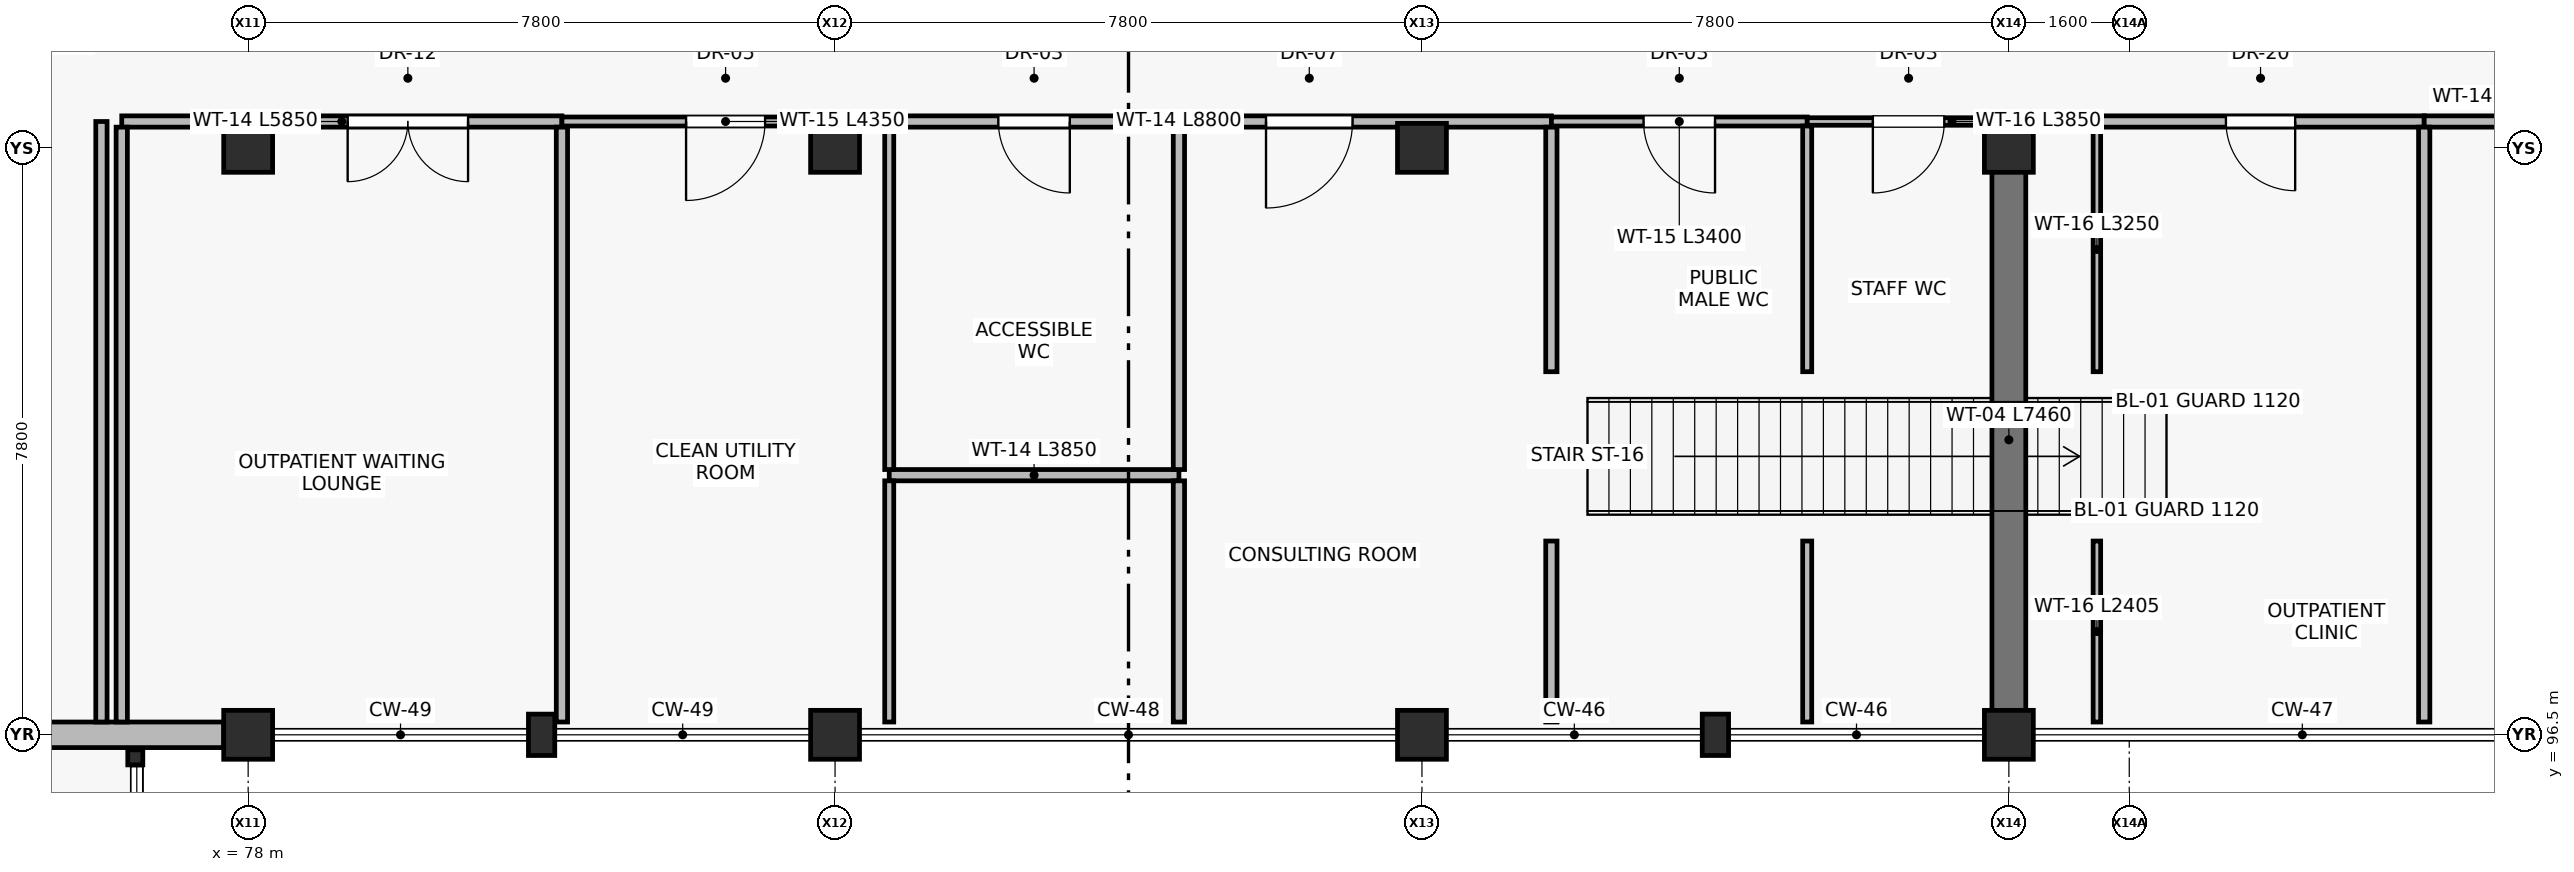
"""IFC4 building model, lengths in metres.
Left out: names, types, materials, properties, quantities, classifications, styles, units other than length and angle.
Written with IfcOpenShell. Run it as: python <this file> out.ifc"""

import sys

from ifc_helpers import new_model, si_unit, direction, frame, frame_2d, origin, origin_2d, place, context, subcontext, project, spatial, rectangle, hollow_rectangle, extrude, element, fill, save


model = new_model("IFC4")
c1 = context("Model", 3, precision=1e-05, world=origin(), true_north=direction((0.0, 1.0)))
c2 = subcontext(c1, "Body", "Model", "MODEL_VIEW")
j1 = project(units=[si_unit("LENGTHUNIT", "METRE"), si_unit("PLANEANGLEUNIT", "RADIAN")], contexts=[c1])
p1 = place(None, origin())
s1 = spatial("IfcSite", under=j1, at=p1, CompositionType="ELEMENT")
p2 = place(p1, origin())
s2 = spatial("IfcBuilding", under=s1, at=p2, CompositionType="ELEMENT")
p3 = place(p2, origin())
s3 = spatial("IfcBuildingStorey", under=s2, at=p3, CompositionType="ELEMENT", Elevation=0.0)
for number, where, z_axis, x_axis in (
    (1, (78.0, 96.5, 0.0), (0.0, 0.0, 1.0), (1.0, 0.0, 0.0)),
    (2, (78.0, 104.3, 0.0), (0.0, 0.0, 1.0), (1.0, 0.0, 0.0)),
    (3, (85.8, 96.5, 0.0), (0.0, 0.0, 1.0), (1.0, 0.0, 0.0)),
    (4, (85.8, 104.3, 0.0), (0.0, 0.0, 1.0), (1.0, 0.0, 0.0)),
    (5, (93.6, 96.5, 0.0), (0.0, 0.0, 1.0), (1.0, 0.0, 0.0)),
    (6, (93.6, 104.3, 0.0), (0.0, 0.0, 1.0), (1.0, 0.0, 0.0)),
    (7, (101.4, 96.5, 0.0), (0.0, 0.0, 1.0), (1.0, 0.0, 0.0)),
    (8, (101.4, 104.3, 0.0), (0.0, 0.0, 1.0), (1.0, 0.0, 0.0)),
):
    element("IfcColumn", number, at=place(p3, frame(where, z_axis=z_axis, x_axis=x_axis)), inside=s3, PredefinedType="COLUMN", context=c2, shape_type="SweptSolid", body=[
        extrude(rectangle(XDim=0.65, YDim=0.65, at=origin_2d()), origin(), (0.0, 0.0, 1.0), 4.8),
    ])
p4 = place(p3, frame((76.5, 96.2, 0.0), z_axis=(0.0, 0.0, 1.0), x_axis=(1.0, 0.0, 0.0)))
e9 = element("IfcColumn", 9, at=p4, inside=s3, PredefinedType="COLUMN", context=c2, shape_type="SweptSolid", body=[
    extrude(hollow_rectangle(XDim=0.2, YDim=0.2, WallThickness=0.01, at=origin_2d()), origin(), (0.0, 0.0, 1.0), 4.8),
])
for number, where, z_axis, x_axis in (
    (10, (81.9, 96.5, 0.0), (0.0, 0.0, 1.0), (1.0, 0.0, 0.0)),
    (11, (97.5, 96.5, 0.0), (0.0, 0.0, 1.0), (1.0, 0.0, 0.0)),
):
    element("IfcColumn", number, at=place(p3, frame(where, z_axis=z_axis, x_axis=x_axis)), inside=s3, PredefinedType="PILASTER", context=c2, shape_type="SweptSolid", body=[
        extrude(rectangle(XDim=0.35, YDim=0.55, at=origin_2d()), origin(), (0.0, 0.0, 1.0), 4.8),
    ])
p5 = place(p3, frame((77.675, 96.5, 0.0), z_axis=(0.0, 0.0, 1.0), x_axis=(-1.0, 0.0, 0.0)))
e12 = element("IfcWall", 12, at=p5, inside=s3, PredefinedType="STANDARD", context=c2, shape_type="SweptSolid", body=[
    extrude(rectangle(XDim=7.15, YDim=0.34, at=frame_2d((3.575, 0.0))), origin(), (0.0, 0.0, 1.0), 3.385),
])
p6 = place(p5, frame((2.475, 0.0, 0.0)))
e13 = element("IfcOpeningElement", 13, at=p6, cuts=e12, PredefinedType="OPENING", context=c2, shape_type="SweptSolid", body=[
    extrude(rectangle(XDim=1.6, YDim=2.2, at=frame_2d((0.8, 1.1))), frame((0.0, 0.18, 0.0), z_axis=(0.0, -1.0, 0.0), x_axis=(1.0, 0.0, 0.0)), (0.0, 0.0, 1.0), 0.36),
])
p7 = place(p3, frame((101.4, 96.69, 0.0), z_axis=(0.0, 0.0, 1.0), x_axis=(0.0, 1.0, 0.0)))
e14 = element("IfcWall", 14, at=p7, inside=s3, PredefinedType="SHEAR", context=c2, shape_type="SweptSolid", body=[
    extrude(rectangle(XDim=7.46, YDim=0.45, at=frame_2d((3.73, 0.0))), origin(), (0.0, 0.0, 1.0), 4.54),
])
p8 = place(p3, frame((76.05, 96.67, 0.0), z_axis=(0.0, 0.0, 1.0), x_axis=(0.0, 1.0, 0.0)))
e15 = element("IfcWall", 15, at=p8, inside=s3, PredefinedType="PARTITIONING", context=c2, shape_type="SweptSolid", body=[
    extrude(rectangle(XDim=7.98, YDim=0.15, at=frame_2d((3.99, 0.0))), origin(), (0.0, 0.0, 1.0), 4.54),
])
p9 = place(p3, frame((82.17, 104.65, 0.0), z_axis=(0.0, 0.0, 1.0), x_axis=(-1.0, 0.0, 0.0)))
e16 = element("IfcWall", 16, at=p9, inside=s3, PredefinedType="PARTITIONING", context=c2, shape_type="SweptSolid", body=[
    extrude(rectangle(XDim=5.85, YDim=0.15, at=frame_2d((2.925, 0.0))), origin(), (0.0, 0.0, 1.0), 4.04),
])
p10 = place(p9, frame((1.248, 0.0, 0.0)))
e17 = element("IfcOpeningElement", 17, at=p10, cuts=e16, PredefinedType="OPENING", context=c2, shape_type="SweptSolid", body=[
    extrude(rectangle(XDim=1.6, YDim=2.2, at=frame_2d((0.8, 1.1))), frame((0.0, 0.085, 0.0), z_axis=(0.0, -1.0, 0.0), x_axis=(1.0, 0.0, 0.0)), (0.0, 0.0, 1.0), 0.17),
])
p11 = place(p3, frame((86.52, 104.65, 0.0), z_axis=(0.0, 0.0, 1.0), x_axis=(-1.0, 0.0, 0.0)))
e18 = element("IfcWall", 18, at=p11, inside=s3, PredefinedType="PARTITIONING", context=c2, shape_type="SweptSolid", body=[
    extrude(rectangle(XDim=4.35, YDim=0.12, at=frame_2d((2.175, 0.0))), origin(), (0.0, 0.0, 1.0), 4.04),
])
p12 = place(p11, frame((1.65, 0.0, 0.0)))
e19 = element("IfcOpeningElement", 19, at=p12, cuts=e18, PredefinedType="OPENING", context=c2, shape_type="SweptSolid", body=[
    extrude(rectangle(XDim=1.05, YDim=2.15, at=frame_2d((0.525, 1.075))), frame((0.0, 0.07, 0.0), z_axis=(0.0, -1.0, 0.0), x_axis=(1.0, 0.0, 0.0)), (0.0, 0.0, 1.0), 0.14),
])
p13 = place(p3, frame((90.37, 104.65, 0.0), z_axis=(0.0, 0.0, 1.0), x_axis=(-1.0, 0.0, 0.0)))
e20 = element("IfcWall", 20, at=p13, inside=s3, PredefinedType="PARTITIONING", context=c2, shape_type="SweptSolid", body=[
    extrude(rectangle(XDim=3.85, YDim=0.15, at=frame_2d((1.925, 0.0))), origin(), (0.0, 0.0, 1.0), 4.04),
])
p14 = place(p13, frame((1.45, 0.0, 0.0)))
e21 = element("IfcOpeningElement", 21, at=p14, cuts=e20, PredefinedType="OPENING", context=c2, shape_type="SweptSolid", body=[
    extrude(rectangle(XDim=0.95, YDim=2.1, at=frame_2d((0.475, 1.05))), frame((0.0, 0.085, 0.0), z_axis=(0.0, -1.0, 0.0), x_axis=(1.0, 0.0, 0.0)), (0.0, 0.0, 1.0), 0.17),
])
p15 = place(p3, frame((86.52, 99.95, 0.0), z_axis=(0.0, 0.0, 1.0), x_axis=(1.0, 0.0, 0.0)))
e22 = element("IfcWall", 22, at=p15, inside=s3, PredefinedType="PARTITIONING", context=c2, shape_type="SweptSolid", body=[
    extrude(rectangle(XDim=3.85, YDim=0.15, at=frame_2d((1.925, 0.0))), origin(), (0.0, 0.0, 1.0), 4.54),
])
p16 = place(p3, frame((95.32, 104.65, 0.0), z_axis=(0.0, 0.0, 1.0), x_axis=(-1.0, 0.0, 0.0)))
e23 = element("IfcWall", 23, at=p16, inside=s3, PredefinedType="PARTITIONING", context=c2, shape_type="SweptSolid", body=[
    extrude(rectangle(XDim=4.95, YDim=0.15, at=frame_2d((2.475, 0.0))), origin(), (0.0, 0.0, 1.0), 4.04),
])
p17 = place(p16, frame((2.643, 0.0, 0.0)))
e24 = element("IfcOpeningElement", 24, at=p17, cuts=e23, PredefinedType="OPENING", context=c2, shape_type="SweptSolid", body=[
    extrude(rectangle(XDim=1.15, YDim=2.2, at=frame_2d((0.575, 1.1))), frame((0.0, 0.085, 0.0), z_axis=(0.0, -1.0, 0.0), x_axis=(1.0, 0.0, 0.0)), (0.0, 0.0, 1.0), 0.17),
])
p18 = place(p3, frame((98.72, 104.65, 0.0), z_axis=(0.0, 0.0, 1.0), x_axis=(-1.0, 0.0, 0.0)))
e25 = element("IfcWall", 25, at=p18, inside=s3, PredefinedType="PARTITIONING", context=c2, shape_type="SweptSolid", body=[
    extrude(rectangle(XDim=3.4, YDim=0.12, at=frame_2d((1.7, 0.0))), origin(), (0.0, 0.0, 1.0), 4.04),
])
p19 = place(p18, frame((1.225, 0.0, 0.0)))
e26 = element("IfcOpeningElement", 26, at=p19, cuts=e25, PredefinedType="OPENING", context=c2, shape_type="SweptSolid", body=[
    extrude(rectangle(XDim=0.95, YDim=2.1, at=frame_2d((0.475, 1.05))), frame((0.0, 0.07, 0.0), z_axis=(0.0, -1.0, 0.0), x_axis=(1.0, 0.0, 0.0)), (0.0, 0.0, 1.0), 0.14),
])
p20 = place(p3, frame((102.57, 104.65, 0.0), z_axis=(0.0, 0.0, 1.0), x_axis=(-1.0, 0.0, 0.0)))
e27 = element("IfcWall", 27, at=p20, inside=s3, PredefinedType="PARTITIONING", context=c2, shape_type="SweptSolid", body=[
    extrude(rectangle(XDim=3.85, YDim=0.1, at=frame_2d((1.925, 0.0))), origin(), (0.0, 0.0, 1.0), 4.04),
])
p21 = place(p20, frame((2.028, 0.0, 0.0)))
e28 = element("IfcOpeningElement", 28, at=p21, cuts=e27, PredefinedType="OPENING", context=c2, shape_type="SweptSolid", body=[
    extrude(rectangle(XDim=0.95, YDim=2.1, at=frame_2d((0.475, 1.05))), frame((0.0, 0.06, 0.0), z_axis=(0.0, -1.0, 0.0), x_axis=(1.0, 0.0, 0.0)), (0.0, 0.0, 1.0), 0.12),
])
p22 = place(p3, frame((106.92, 104.65, 0.0), z_axis=(0.0, 0.0, 1.0), x_axis=(-1.0, 0.0, 0.0)))
e29 = element("IfcWall", 29, at=p22, inside=s3, PredefinedType="PARTITIONING", context=c2, shape_type="SweptSolid", body=[
    extrude(rectangle(XDim=4.35, YDim=0.15, at=frame_2d((2.175, 0.0))), origin(), (0.0, 0.0, 1.0), 4.04),
])
p23 = place(p22, frame((1.715, 0.0, 0.0)))
e30 = element("IfcOpeningElement", 30, at=p23, cuts=e29, PredefinedType="OPENING", context=c2, shape_type="SweptSolid", body=[
    extrude(rectangle(XDim=0.92, YDim=2.15, at=frame_2d((0.46, 1.075))), frame((0.0, 0.085, 0.0), z_axis=(0.0, -1.0, 0.0), x_axis=(1.0, 0.0, 0.0)), (0.0, 0.0, 1.0), 0.17),
])
p24 = place(p3, frame((113.32, 104.65, 0.0), z_axis=(0.0, 0.0, 1.0), x_axis=(-1.0, 0.0, 0.0)))
e31 = element("IfcWall", 31, at=p24, inside=s3, PredefinedType="PARTITIONING", context=c2, shape_type="SweptSolid", body=[
    extrude(rectangle(XDim=6.4, YDim=0.15, at=frame_2d((3.2, 0.0))), origin(), (0.0, 0.0, 1.0), 4.04),
])
p25 = place(p24, frame((1.7, 0.0, 0.0)))
e32 = element("IfcOpeningElement", 32, at=p25, cuts=e31, PredefinedType="OPENING", context=c2, shape_type="SweptSolid", body=[
    extrude(rectangle(XDim=1.08, YDim=2.2, at=frame_2d((0.54, 1.1))), frame((0.0, 0.085, 0.0), z_axis=(0.0, -1.0, 0.0), x_axis=(1.0, 0.0, 0.0)), (0.0, 0.0, 1.0), 0.17),
])
for number, where, z_axis, x_axis in (
    (33, (76.32, 96.67, 0.0), (0.0, 0.0, 1.0), (0.0, 1.0, 0.0)),
    (34, (82.17, 96.67, 0.0), (0.0, 0.0, 1.0), (0.0, 1.0, 0.0)),
):
    element("IfcWall", number, at=place(p3, frame(where, z_axis=z_axis, x_axis=x_axis)), inside=s3, PredefinedType="PARTITIONING", context=c2, shape_type="SweptSolid", body=[
        extrude(rectangle(XDim=7.905, YDim=0.15, at=frame_2d((3.953, 0.0))), origin(), (0.0, 0.0, 1.0), 4.54),
    ])
p26 = place(p3, frame((86.52, 96.67, 0.0), z_axis=(0.0, 0.0, 1.0), x_axis=(0.0, 1.0, 0.0)))
e35 = element("IfcWall", 35, at=p26, inside=s3, PredefinedType="PARTITIONING", context=c2, shape_type="SweptSolid", body=[
    extrude(rectangle(XDim=3.205, YDim=0.12, at=frame_2d((1.603, 0.0))), origin(), (0.0, 0.0, 1.0), 4.54),
])
p27 = place(p3, frame((86.52, 100.025, 0.0), z_axis=(0.0, 0.0, 1.0), x_axis=(0.0, 1.0, 0.0)))
e36 = element("IfcWall", 36, at=p27, inside=s3, PredefinedType="PARTITIONING", context=c2, shape_type="SweptSolid", body=[
    extrude(rectangle(XDim=4.55, YDim=0.12, at=frame_2d((2.275, 0.0))), origin(), (0.0, 0.0, 1.0), 4.54),
])
p28 = place(p3, frame((90.37, 100.025, 0.0), z_axis=(0.0, 0.0, 1.0), x_axis=(0.0, 1.0, 0.0)))
e37 = element("IfcWall", 37, at=p28, inside=s3, PredefinedType="PARTITIONING", context=c2, shape_type="SweptSolid", body=[
    extrude(rectangle(XDim=4.55, YDim=0.15, at=frame_2d((2.275, 0.0))), origin(), (0.0, 0.0, 1.0), 4.54),
])
p29 = place(p3, frame((90.37, 96.67, 0.0), z_axis=(0.0, 0.0, 1.0), x_axis=(0.0, 1.0, 0.0)))
e38 = element("IfcWall", 38, at=p29, inside=s3, PredefinedType="PARTITIONING", context=c2, shape_type="SweptSolid", body=[
    extrude(rectangle(XDim=3.205, YDim=0.15, at=frame_2d((1.603, 0.0))), origin(), (0.0, 0.0, 1.0), 4.54),
])
p30 = place(p3, frame((95.32, 96.67, 0.0), z_axis=(0.0, 0.0, 1.0), x_axis=(0.0, 1.0, 0.0)))
e39 = element("IfcWall", 39, at=p30, inside=s3, PredefinedType="PARTITIONING", context=c2, shape_type="SweptSolid", body=[
    extrude(rectangle(XDim=2.405, YDim=0.15, at=frame_2d((1.203, 0.0))), origin(), (0.0, 0.0, 1.0), 4.54),
])
p31 = place(p3, frame((95.32, 101.325, 0.0), z_axis=(0.0, 0.0, 1.0), x_axis=(0.0, 1.0, 0.0)))
e40 = element("IfcWall", 40, at=p31, inside=s3, PredefinedType="PARTITIONING", context=c2, shape_type="SweptSolid", body=[
    extrude(rectangle(XDim=3.25, YDim=0.15, at=frame_2d((1.625, 0.0))), origin(), (0.0, 0.0, 1.0), 4.54),
])
p32 = place(p3, frame((98.72, 96.67, 0.0), z_axis=(0.0, 0.0, 1.0), x_axis=(0.0, 1.0, 0.0)))
e41 = element("IfcWall", 41, at=p32, inside=s3, PredefinedType="PARTITIONING", context=c2, shape_type="SweptSolid", body=[
    extrude(rectangle(XDim=2.405, YDim=0.12, at=frame_2d((1.203, 0.0))), origin(), (0.0, 0.0, 1.0), 4.54),
])
p33 = place(p3, frame((98.72, 101.325, 0.0), z_axis=(0.0, 0.0, 1.0), x_axis=(0.0, 1.0, 0.0)))
e42 = element("IfcWall", 42, at=p33, inside=s3, PredefinedType="PARTITIONING", context=c2, shape_type="SweptSolid", body=[
    extrude(rectangle(XDim=3.265, YDim=0.12, at=frame_2d((1.633, 0.0))), origin(), (0.0, 0.0, 1.0), 4.54),
])
p34 = place(p3, frame((102.57, 96.67, 0.0), z_axis=(0.0, 0.0, 1.0), x_axis=(0.0, 1.0, 0.0)))
e43 = element("IfcWall", 43, at=p34, inside=s3, PredefinedType="PARTITIONING", context=c2, shape_type="SweptSolid", body=[
    extrude(rectangle(XDim=2.405, YDim=0.1, at=frame_2d((1.203, 0.0))), origin(), (0.0, 0.0, 1.0), 4.54),
])
p35 = place(p3, frame((102.57, 101.325, 0.0), z_axis=(0.0, 0.0, 1.0), x_axis=(0.0, 1.0, 0.0)))
e44 = element("IfcWall", 44, at=p35, inside=s3, PredefinedType="PARTITIONING", context=c2, shape_type="SweptSolid", body=[
    extrude(rectangle(XDim=3.25, YDim=0.1, at=frame_2d((1.625, 0.0))), origin(), (0.0, 0.0, 1.0), 4.54),
])
p36 = place(p3, frame((106.92, 96.67, 0.0), z_axis=(0.0, 0.0, 1.0), x_axis=(0.0, 1.0, 0.0)))
e45 = element("IfcWall", 45, at=p36, inside=s3, PredefinedType="PARTITIONING", context=c2, shape_type="SweptSolid", body=[
    extrude(rectangle(XDim=7.905, YDim=0.15, at=frame_2d((3.953, 0.0))), origin(), (0.0, 0.0, 1.0), 4.21),
])
p37 = place(p10, origin())
e46 = element("IfcDoor", 46, at=p37, inside=s3, OperationType="DOUBLE_DOOR_SINGLE_SWING", PredefinedType="DOOR", context=c2, shape_type="SweptSolid", body=[
    extrude(rectangle(XDim=1.6, YDim=2.2, at=frame_2d((0.8, 1.1))), frame((0.0, 0.025, 0.0), z_axis=(0.0, -1.0, 0.0), x_axis=(1.0, 0.0, 0.0)), (0.0, 0.0, 1.0), 0.05),
])
fill(e17, e46)
p38 = place(p12, origin())
e47 = element("IfcDoor", 47, at=p38, inside=s3, OperationType="SINGLE_SWING_RIGHT", PredefinedType="DOOR", context=c2, shape_type="SweptSolid", body=[
    extrude(rectangle(XDim=1.05, YDim=2.15, at=frame_2d((0.525, 1.075))), frame((0.0, 0.025, 0.0), z_axis=(0.0, -1.0, 0.0), x_axis=(1.0, 0.0, 0.0)), (0.0, 0.0, 1.0), 0.05),
])
fill(e19, e47)
p39 = place(p14, origin())
e48 = element("IfcDoor", 48, at=p39, inside=s3, OperationType="SINGLE_SWING_LEFT", PredefinedType="DOOR", context=c2, shape_type="SweptSolid", body=[
    extrude(rectangle(XDim=0.95, YDim=2.1, at=frame_2d((0.475, 1.05))), frame((0.0, 0.025, 0.0), z_axis=(0.0, -1.0, 0.0), x_axis=(1.0, 0.0, 0.0)), (0.0, 0.0, 1.0), 0.05),
])
fill(e21, e48)
p40 = place(p17, origin())
e49 = element("IfcDoor", 49, at=p40, inside=s3, OperationType="SINGLE_SWING_RIGHT", PredefinedType="DOOR", context=c2, shape_type="SweptSolid", body=[
    extrude(rectangle(XDim=1.15, YDim=2.2, at=frame_2d((0.575, 1.1))), frame((0.0, 0.025, 0.0), z_axis=(0.0, -1.0, 0.0), x_axis=(1.0, 0.0, 0.0)), (0.0, 0.0, 1.0), 0.05),
])
fill(e24, e49)
p41 = place(p19, origin())
e50 = element("IfcDoor", 50, at=p41, inside=s3, OperationType="SINGLE_SWING_LEFT", PredefinedType="DOOR", context=c2, shape_type="SweptSolid", body=[
    extrude(rectangle(XDim=0.95, YDim=2.1, at=frame_2d((0.475, 1.05))), frame((0.0, 0.025, 0.0), z_axis=(0.0, -1.0, 0.0), x_axis=(1.0, 0.0, 0.0)), (0.0, 0.0, 1.0), 0.05),
])
fill(e26, e50)
p42 = place(p21, origin())
e51 = element("IfcDoor", 51, at=p42, inside=s3, OperationType="SINGLE_SWING_RIGHT", PredefinedType="DOOR", context=c2, shape_type="SweptSolid", body=[
    extrude(rectangle(XDim=0.95, YDim=2.1, at=frame_2d((0.475, 1.05))), frame((0.0, 0.025, 0.0), z_axis=(0.0, -1.0, 0.0), x_axis=(1.0, 0.0, 0.0)), (0.0, 0.0, 1.0), 0.05),
])
fill(e28, e51)
p43 = place(p23, origin())
e52 = element("IfcDoor", 52, at=p43, inside=s3, OperationType="SINGLE_SWING_LEFT", PredefinedType="DOOR", context=c2, shape_type="SweptSolid", body=[
    extrude(rectangle(XDim=0.92, YDim=2.15, at=frame_2d((0.46, 1.075))), frame((0.0, 0.025, 0.0), z_axis=(0.0, -1.0, 0.0), x_axis=(1.0, 0.0, 0.0)), (0.0, 0.0, 1.0), 0.05),
])
fill(e30, e52)
save(model, sys.argv[1])
